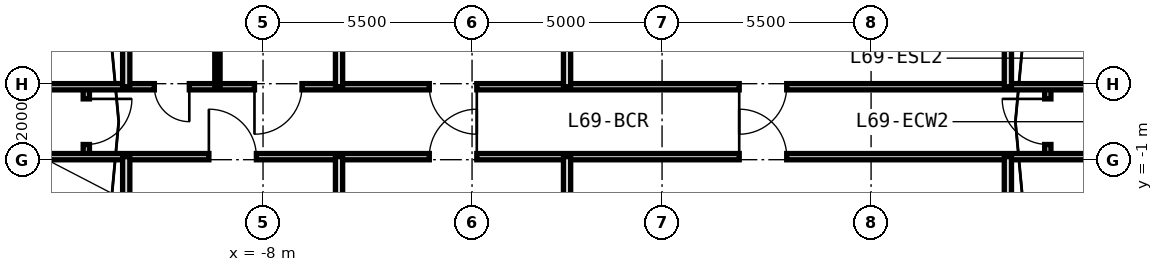
"""IFC4 building model, lengths in metres.
Left out: names, types, materials, properties, quantities, classifications, styles, units other than length and angle.
Written with IfcOpenShell. Run it as: python <this file> out.ifc"""

import sys

from ifc_helpers import new_model, si_unit, direction, frame, frame_2d, origin, place, context, subcontext, project, spatial, rectangle, extrude, source, transform, mapped, element, fill, save


model = new_model("IFC4")
c1 = context("Model", 3, precision=1e-05, world=origin(), true_north=direction((0.0, 1.0)))
c2 = subcontext(c1, "Body", "Model", "MODEL_VIEW")
j1 = project(units=[si_unit("LENGTHUNIT", "METRE"), si_unit("PLANEANGLEUNIT", "RADIAN")], contexts=[c1])
p1 = place(None, origin())
s1 = spatial("IfcSite", under=j1, at=p1, CompositionType="ELEMENT")
p2 = place(p1, origin())
s2 = spatial("IfcBuilding", under=s1, at=p2, CompositionType="ELEMENT")
p3 = place(p2, frame((0.0, 0.0, 223.05)))
s3 = spatial("IfcBuildingStorey", under=s2, at=p3, CompositionType="ELEMENT", Elevation=223.05)
m1 = source(origin(), c2, "Body", "SweptSolid", [
    extrude(rectangle(XDim=1.84, YDim=0.165, at=frame_2d((0.92, 0.0))), origin(), (0.0, 0.0, 1.0), 2.745),
])
p4 = place(p3, frame((-12.65, -0.92, 0.0), z_axis=(0.0, 0.0, 1.0), x_axis=(0.0, 1.0, 0.0)))
e1 = element("IfcWall", 1, at=p4, inside=s3, PredefinedType="PARTITIONING", context=c2, shape_type="MappedRepresentation", body=[
    mapped(m1, transform((0.0, 0.0, 0.0), x_axis=(1.0, 0.0, 0.0), y_axis=(0.0, 1.0, 0.0), z_axis=(0.0, 0.0, 1.0), scale=1.0)),
])
p5 = place(p4, frame((0.32, 0.0, 0.0)))
e2 = element("IfcOpeningElement", 2, at=p5, cuts=e1, PredefinedType="OPENING", context=c2, shape_type="SweptSolid", body=[
    extrude(rectangle(XDim=1.2, YDim=2.15, at=frame_2d((0.6, 1.075))), frame((0.0, 0.093, 0.0), z_axis=(0.0, -1.0, 0.0), x_axis=(1.0, 0.0, 0.0)), (0.0, 0.0, 1.0), 0.185),
])
p6 = place(p3, frame((12.65, -0.92, 0.0), z_axis=(0.0, 0.0, 1.0), x_axis=(0.0, 1.0, 0.0)))
e3 = element("IfcWall", 3, at=p6, inside=s3, PredefinedType="PARTITIONING", context=c2, shape_type="MappedRepresentation", body=[
    mapped(m1, transform((0.0, 0.0, 0.0), x_axis=(1.0, 0.0, 0.0), y_axis=(0.0, 1.0, 0.0), z_axis=(0.0, 0.0, 1.0), scale=1.0)),
])
p7 = place(p6, frame((0.32, 0.0, 0.0)))
e4 = element("IfcOpeningElement", 4, at=p7, cuts=e3, PredefinedType="OPENING", context=c2, shape_type="SweptSolid", body=[
    extrude(rectangle(XDim=1.2, YDim=2.15, at=frame_2d((0.6, 1.075))), frame((0.0, 0.093, 0.0), z_axis=(0.0, -1.0, 0.0), x_axis=(1.0, 0.0, 0.0)), (0.0, 0.0, 1.0), 0.185),
])
m2 = source(origin(), c2, "Body", "SweptSolid", [
    extrude(rectangle(XDim=37.0, YDim=0.165, at=frame_2d((18.5, 0.0))), origin(), (0.0, 0.0, 1.0), 2.745),
])
p8 = place(p3, frame((-18.5, -0.92, 0.0), z_axis=(0.0, 0.0, 1.0), x_axis=(1.0, 0.0, 0.0)))
e5 = element("IfcWall", 5, at=p8, inside=s3, PredefinedType="PARTITIONING", context=c2, shape_type="MappedRepresentation", body=[
    mapped(m2, transform((0.0, 0.0, 0.0), x_axis=(1.0, 0.0, 0.0), y_axis=(0.0, 1.0, 0.0), z_axis=(0.0, 0.0, 1.0), scale=1.0)),
])
p9 = place(p8, frame((2.662, 0.0, 0.0)))
e6 = element("IfcOpeningElement", 6, at=p9, cuts=e5, PredefinedType="OPENING", context=c2, shape_type="SweptSolid", body=[
    extrude(rectangle(XDim=0.95, YDim=2.1, at=frame_2d((0.475, 1.05))), frame((0.0, 0.093, 0.0), z_axis=(0.0, -1.0, 0.0), x_axis=(1.0, 0.0, 0.0)), (0.0, 0.0, 1.0), 0.185),
])
p10 = place(p8, frame((33.388, 0.0, 0.0)))
e7 = element("IfcOpeningElement", 7, at=p10, cuts=e5, PredefinedType="OPENING", context=c2, shape_type="SweptSolid", body=[
    extrude(rectangle(XDim=0.95, YDim=2.1, at=frame_2d((0.475, 1.05))), frame((0.0, 0.093, 0.0), z_axis=(0.0, -1.0, 0.0), x_axis=(1.0, 0.0, 0.0)), (0.0, 0.0, 1.0), 0.185),
])
p11 = place(p8, frame((9.075, 0.0, 0.0)))
e8 = element("IfcOpeningElement", 8, at=p11, cuts=e5, PredefinedType="OPENING", context=c2, shape_type="SweptSolid", body=[
    extrude(rectangle(XDim=1.25, YDim=2.2, at=frame_2d((0.625, 1.1))), frame((0.0, 0.093, 0.0), z_axis=(0.0, -1.0, 0.0), x_axis=(1.0, 0.0, 0.0)), (0.0, 0.0, 1.0), 0.185),
])
p12 = place(p8, frame((14.875, 0.0, 0.0)))
e9 = element("IfcOpeningElement", 9, at=p12, cuts=e5, PredefinedType="OPENING", context=c2, shape_type="SweptSolid", body=[
    extrude(rectangle(XDim=1.25, YDim=2.2, at=frame_2d((0.625, 1.1))), frame((0.0, 0.093, 0.0), z_axis=(0.0, -1.0, 0.0), x_axis=(1.0, 0.0, 0.0)), (0.0, 0.0, 1.0), 0.185),
])
p13 = place(p8, frame((23.03, 0.0, 0.0)))
e10 = element("IfcOpeningElement", 10, at=p13, cuts=e5, PredefinedType="OPENING", context=c2, shape_type="SweptSolid", body=[
    extrude(rectangle(XDim=1.25, YDim=2.2, at=frame_2d((0.625, 1.1))), frame((0.0, 0.093, 0.0), z_axis=(0.0, -1.0, 0.0), x_axis=(1.0, 0.0, 0.0)), (0.0, 0.0, 1.0), 0.185),
])
p14 = place(p3, frame((-18.5, 0.92, 0.0), z_axis=(0.0, 0.0, 1.0), x_axis=(1.0, 0.0, 0.0)))
e11 = element("IfcWall", 11, at=p14, inside=s3, PredefinedType="PARTITIONING", context=c2, shape_type="MappedRepresentation", body=[
    mapped(m2, transform((0.0, 0.0, 0.0), x_axis=(1.0, 0.0, 0.0), y_axis=(0.0, 1.0, 0.0), z_axis=(0.0, 0.0, 1.0), scale=1.0)),
])
p15 = place(p14, frame((2.662, 0.0, 0.0)))
e12 = element("IfcOpeningElement", 12, at=p15, cuts=e11, PredefinedType="OPENING", context=c2, shape_type="SweptSolid", body=[
    extrude(rectangle(XDim=0.95, YDim=2.1, at=frame_2d((0.475, 1.05))), frame((0.0, 0.093, 0.0), z_axis=(0.0, -1.0, 0.0), x_axis=(1.0, 0.0, 0.0)), (0.0, 0.0, 1.0), 0.185),
])
p16 = place(p14, frame((33.388, 0.0, 0.0)))
e13 = element("IfcOpeningElement", 13, at=p16, cuts=e11, PredefinedType="OPENING", context=c2, shape_type="SweptSolid", body=[
    extrude(rectangle(XDim=0.95, YDim=2.1, at=frame_2d((0.475, 1.05))), frame((0.0, 0.093, 0.0), z_axis=(0.0, -1.0, 0.0), x_axis=(1.0, 0.0, 0.0)), (0.0, 0.0, 1.0), 0.185),
])
p17 = place(p14, frame((7.64, 0.0, 0.0)))
e14 = element("IfcOpeningElement", 14, at=p17, cuts=e11, PredefinedType="OPENING", context=c2, shape_type="SweptSolid", body=[
    extrude(rectangle(XDim=0.92, YDim=2.1, at=frame_2d((0.46, 1.05))), frame((0.0, 0.093, 0.0), z_axis=(0.0, -1.0, 0.0), x_axis=(1.0, 0.0, 0.0)), (0.0, 0.0, 1.0), 0.185),
])
p18 = place(p14, frame((10.275, 0.0, 0.0)))
e15 = element("IfcOpeningElement", 15, at=p18, cuts=e11, PredefinedType="OPENING", context=c2, shape_type="SweptSolid", body=[
    extrude(rectangle(XDim=1.25, YDim=2.2, at=frame_2d((0.625, 1.1))), frame((0.0, 0.093, 0.0), z_axis=(0.0, -1.0, 0.0), x_axis=(1.0, 0.0, 0.0)), (0.0, 0.0, 1.0), 0.185),
])
p19 = place(p14, frame((14.875, 0.0, 0.0)))
e16 = element("IfcOpeningElement", 16, at=p19, cuts=e11, PredefinedType="OPENING", context=c2, shape_type="SweptSolid", body=[
    extrude(rectangle(XDim=1.25, YDim=2.2, at=frame_2d((0.625, 1.1))), frame((0.0, 0.093, 0.0), z_axis=(0.0, -1.0, 0.0), x_axis=(1.0, 0.0, 0.0)), (0.0, 0.0, 1.0), 0.185),
])
p20 = place(p14, frame((23.03, 0.0, 0.0)))
e17 = element("IfcOpeningElement", 17, at=p20, cuts=e11, PredefinedType="OPENING", context=c2, shape_type="SweptSolid", body=[
    extrude(rectangle(XDim=1.25, YDim=2.2, at=frame_2d((0.625, 1.1))), frame((0.0, 0.093, 0.0), z_axis=(0.0, -1.0, 0.0), x_axis=(1.0, 0.0, 0.0)), (0.0, 0.0, 1.0), 0.185),
])
m3 = source(origin(), c2, "Body", "SweptSolid", [
    extrude(rectangle(XDim=9.88, YDim=0.19, at=frame_2d((4.94, 0.0))), origin(), (0.0, 0.0, 1.0), 2.745),
])
for number, where, z_axis, x_axis in (
    (18, (-11.6, -10.8, 0.0), (0.0, 0.0, 1.0), (0.0, 1.0, 0.0)),
    (19, (-11.6, 0.92, 0.0), (0.0, 0.0, 1.0), (0.0, 1.0, 0.0)),
    (20, (11.6, -10.8, 0.0), (0.0, 0.0, 1.0), (0.0, 1.0, 0.0)),
    (21, (11.6, 0.92, 0.0), (0.0, 0.0, 1.0), (0.0, 1.0, 0.0)),
):
    element("IfcWall", number, at=place(p3, frame(where, z_axis=z_axis, x_axis=x_axis)), inside=s3, PredefinedType="PARTITIONING", context=c2, shape_type="MappedRepresentation", body=[
        mapped(m3, transform((0.0, 0.0, 0.0), x_axis=(1.0, 0.0, 0.0), y_axis=(0.0, 1.0, 0.0), z_axis=(0.0, 0.0, 1.0), scale=1.0)),
    ])
m4 = source(origin(), c2, "Body", "SweptSolid", [
    extrude(rectangle(XDim=9.88, YDim=0.19, at=frame_2d((4.94, 0.0))), origin(), (0.0, 0.0, 1.0), 2.045),
])
for number, where, z_axis, x_axis in (
    (22, (-6.0, -10.8, 0.0), (0.0, 0.0, 1.0), (0.0, 1.0, 0.0)),
    (23, (-6.0, 0.92, 0.0), (0.0, 0.0, 1.0), (0.0, 1.0, 0.0)),
):
    element("IfcWall", number, at=place(p3, frame(where, z_axis=z_axis, x_axis=x_axis)), inside=s3, PredefinedType="PARTITIONING", context=c2, shape_type="MappedRepresentation", body=[
        mapped(m4, transform((0.0, 0.0, 0.0), x_axis=(1.0, 0.0, 0.0), y_axis=(0.0, 1.0, 0.0), z_axis=(0.0, 0.0, 1.0), scale=1.0)),
    ])
m5 = source(origin(), c2, "Body", "SweptSolid", [
    extrude(rectangle(XDim=9.88, YDim=0.14, at=frame_2d((4.94, 0.0))), origin(), (0.0, 0.0, 1.0), 2.745),
])
p21 = place(p3, frame((-9.2, 0.92, 0.0), z_axis=(0.0, 0.0, 1.0), x_axis=(0.0, 1.0, 0.0)))
e24 = element("IfcWall", 24, at=p21, inside=s3, PredefinedType="PARTITIONING", context=c2, shape_type="MappedRepresentation", body=[
    mapped(m5, transform((0.0, 0.0, 0.0), x_axis=(1.0, 0.0, 0.0), y_axis=(0.0, 1.0, 0.0), z_axis=(0.0, 0.0, 1.0), scale=1.0)),
])
for number, where, z_axis, x_axis in (
    (25, (0.0, -10.8, 0.0), (0.0, 0.0, 1.0), (0.0, 1.0, 0.0)),
    (26, (0.0, 0.92, 0.0), (0.0, 0.0, 1.0), (0.0, 1.0, 0.0)),
):
    element("IfcWall", number, at=place(p3, frame(where, z_axis=z_axis, x_axis=x_axis)), inside=s3, PredefinedType="PARTITIONING", context=c2, shape_type="MappedRepresentation", body=[
        mapped(m4, transform((0.0, 0.0, 0.0), x_axis=(1.0, 0.0, 0.0), y_axis=(0.0, 1.0, 0.0), z_axis=(0.0, 0.0, 1.0), scale=1.0)),
    ])
m6 = source(origin(), c2, "Body", "SweptSolid", [
    extrude(rectangle(XDim=1.2, YDim=2.15, at=frame_2d((0.6, 1.075))), frame((0.0, 0.025, 0.0), z_axis=(0.0, -1.0, 0.0), x_axis=(1.0, 0.0, 0.0)), (0.0, 0.0, 1.0), 0.05),
])
p22 = place(p5, frame((1.2, 0.0, 0.0), z_axis=(0.0, 0.0, 1.0), x_axis=(-1.0, 0.0, 0.0)))
e27 = element("IfcDoor", 27, at=p22, inside=s3, OperationType="SINGLE_SWING_LEFT", PredefinedType="DOOR", context=c2, shape_type="MappedRepresentation", body=[
    mapped(m6, transform((0.0, 0.0, 0.0), x_axis=(1.0, 0.0, 0.0), y_axis=(0.0, 1.0, 0.0), z_axis=(0.0, 0.0, 1.0), scale=1.0)),
])
fill(e2, e27)
p23 = place(p7, origin())
e28 = element("IfcDoor", 28, at=p23, inside=s3, OperationType="SINGLE_SWING_RIGHT", PredefinedType="DOOR", context=c2, shape_type="MappedRepresentation", body=[
    mapped(m6, transform((0.0, 0.0, 0.0), x_axis=(1.0, 0.0, 0.0), y_axis=(0.0, 1.0, 0.0), z_axis=(0.0, 0.0, 1.0), scale=1.0)),
])
fill(e4, e28)
m7 = source(origin(), c2, "Body", "SweptSolid", [
    extrude(rectangle(XDim=1.25, YDim=2.2, at=frame_2d((0.625, 1.1))), frame((0.0, 0.025, 0.0), z_axis=(0.0, -1.0, 0.0), x_axis=(1.0, 0.0, 0.0)), (0.0, 0.0, 1.0), 0.05),
])
p24 = place(p11, origin())
e29 = element("IfcDoor", 29, at=p24, inside=s3, OperationType="SINGLE_SWING_LEFT", PredefinedType="DOOR", context=c2, shape_type="MappedRepresentation", body=[
    mapped(m7, transform((0.0, 0.0, 0.0), x_axis=(1.0, 0.0, 0.0), y_axis=(0.0, 1.0, 0.0), z_axis=(0.0, 0.0, 1.0), scale=1.0)),
])
fill(e8, e29)
m8 = source(origin(), c2, "Body", "SweptSolid", [
    extrude(rectangle(XDim=0.92, YDim=2.1, at=frame_2d((0.46, 1.05))), frame((0.0, 0.025, 0.0), z_axis=(0.0, -1.0, 0.0), x_axis=(1.0, 0.0, 0.0)), (0.0, 0.0, 1.0), 0.05),
])
p25 = place(p17, frame((0.92, 0.0, 0.0), z_axis=(0.0, 0.0, 1.0), x_axis=(-1.0, 0.0, 0.0)))
e30 = element("IfcDoor", 30, at=p25, inside=s3, OperationType="SINGLE_SWING_LEFT", PredefinedType="DOOR", context=c2, shape_type="MappedRepresentation", body=[
    mapped(m8, transform((0.0, 0.0, 0.0), x_axis=(1.0, 0.0, 0.0), y_axis=(0.0, 1.0, 0.0), z_axis=(0.0, 0.0, 1.0), scale=1.0)),
])
fill(e14, e30)
p26 = place(p18, frame((1.25, 0.0, 0.0), z_axis=(0.0, 0.0, 1.0), x_axis=(-1.0, 0.0, 0.0)))
e31 = element("IfcDoor", 31, at=p26, inside=s3, OperationType="SINGLE_SWING_RIGHT", PredefinedType="DOOR", context=c2, shape_type="MappedRepresentation", body=[
    mapped(m7, transform((0.0, 0.0, 0.0), x_axis=(1.0, 0.0, 0.0), y_axis=(0.0, 1.0, 0.0), z_axis=(0.0, 0.0, 1.0), scale=1.0)),
])
fill(e15, e31)
p27 = place(p12, origin())
e32 = element("IfcDoor", 32, at=p27, inside=s3, OperationType="SINGLE_SWING_RIGHT", PredefinedType="DOOR", context=c2, shape_type="MappedRepresentation", body=[
    mapped(m7, transform((0.0, 0.0, 0.0), x_axis=(1.0, 0.0, 0.0), y_axis=(0.0, 1.0, 0.0), z_axis=(0.0, 0.0, 1.0), scale=1.0)),
])
fill(e9, e32)
p28 = place(p19, frame((1.25, 0.0, 0.0), z_axis=(0.0, 0.0, 1.0), x_axis=(-1.0, 0.0, 0.0)))
e33 = element("IfcDoor", 33, at=p28, inside=s3, OperationType="SINGLE_SWING_LEFT", PredefinedType="DOOR", context=c2, shape_type="MappedRepresentation", body=[
    mapped(m7, transform((0.0, 0.0, 0.0), x_axis=(1.0, 0.0, 0.0), y_axis=(0.0, 1.0, 0.0), z_axis=(0.0, 0.0, 1.0), scale=1.0)),
])
fill(e16, e33)
p29 = place(p13, origin())
e34 = element("IfcDoor", 34, at=p29, inside=s3, OperationType="SINGLE_SWING_LEFT", PredefinedType="DOOR", context=c2, shape_type="MappedRepresentation", body=[
    mapped(m7, transform((0.0, 0.0, 0.0), x_axis=(1.0, 0.0, 0.0), y_axis=(0.0, 1.0, 0.0), z_axis=(0.0, 0.0, 1.0), scale=1.0)),
])
fill(e10, e34)
p30 = place(p20, frame((1.25, 0.0, 0.0), z_axis=(0.0, 0.0, 1.0), x_axis=(-1.0, 0.0, 0.0)))
e35 = element("IfcDoor", 35, at=p30, inside=s3, OperationType="SINGLE_SWING_RIGHT", PredefinedType="DOOR", context=c2, shape_type="MappedRepresentation", body=[
    mapped(m7, transform((0.0, 0.0, 0.0), x_axis=(1.0, 0.0, 0.0), y_axis=(0.0, 1.0, 0.0), z_axis=(0.0, 0.0, 1.0), scale=1.0)),
])
fill(e17, e35)
save(model, sys.argv[1])
